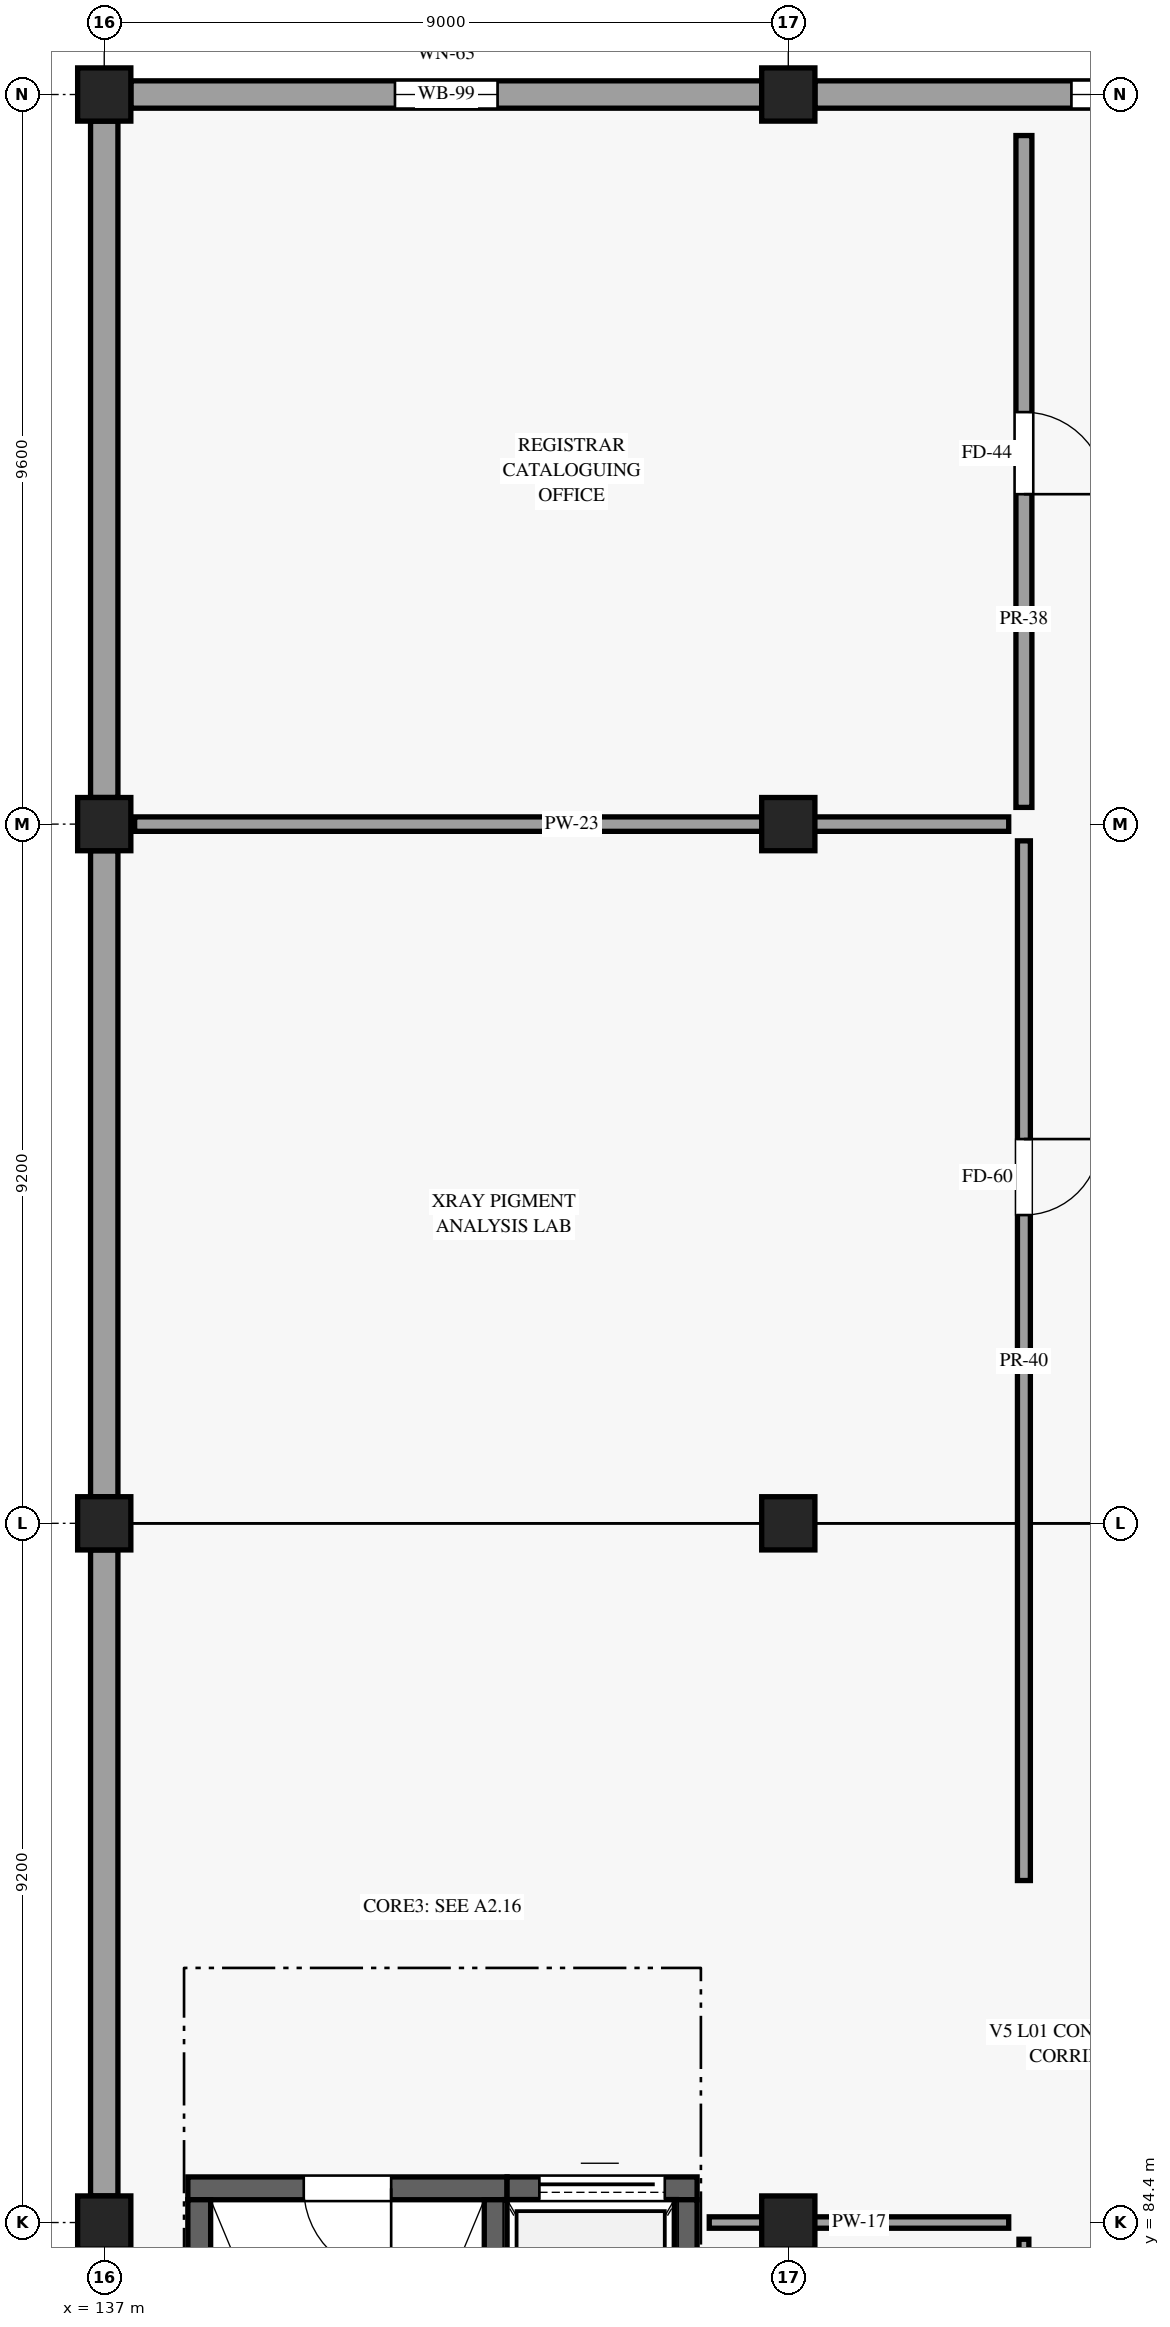
"""IFC4 building model, lengths in metres.
Left out: names, types, materials, properties, quantities, classifications, styles, units other than length and angle.
Written with IfcOpenShell. Run it as: python <this file> out.ifc"""

import sys

from ifc_helpers import new_model, si_unit, direction, frame, frame_2d, origin, origin_2d, place, context, subcontext, project, spatial, rectangle, extrude, element, fill, save


model = new_model("IFC4")
c1 = context("Model", 3, precision=1e-05, world=origin(), true_north=direction((0.0, 1.0)))
c2 = subcontext(c1, "Body", "Model", "MODEL_VIEW")
j1 = project(units=[si_unit("LENGTHUNIT", "METRE"), si_unit("PLANEANGLEUNIT", "RADIAN")], contexts=[c1])
p1 = place(None, origin())
s1 = spatial("IfcSite", under=j1, at=p1, CompositionType="ELEMENT")
p2 = place(p1, origin())
s2 = spatial("IfcBuilding", under=s1, at=p2, CompositionType="ELEMENT")
p3 = place(p2, frame((0.0, 0.0, 5.4)))
s3 = spatial("IfcBuildingStorey", under=s2, at=p3, CompositionType="ELEMENT", Elevation=5.4)
for number, where, z_axis, x_axis in (
    (1, (137.0, 84.4, 0.0), (0.0, 0.0, 1.0), (1.0, 0.0, 0.0)),
    (2, (137.0, 93.6, 0.0), (0.0, 0.0, 1.0), (1.0, 0.0, 0.0)),
    (3, (137.0, 102.8, 0.0), (0.0, 0.0, 1.0), (1.0, 0.0, 0.0)),
    (4, (137.0, 112.4, 0.0), (0.0, 0.0, 1.0), (1.0, 0.0, 0.0)),
    (5, (146.0, 84.4, 0.0), (0.0, 0.0, 1.0), (1.0, 0.0, 0.0)),
    (6, (146.0, 93.6, 0.0), (0.0, 0.0, 1.0), (1.0, 0.0, 0.0)),
    (7, (146.0, 102.8, 0.0), (0.0, 0.0, 1.0), (1.0, 0.0, 0.0)),
    (8, (146.0, 112.4, 0.0), (0.0, 0.0, 1.0), (1.0, 0.0, 0.0)),
):
    element("IfcColumn", number, at=place(p3, frame(where, z_axis=z_axis, x_axis=x_axis)), inside=s3, PredefinedType="COLUMN", context=c2, shape_type="SweptSolid", body=[
        extrude(rectangle(XDim=0.7, YDim=0.7, at=origin_2d()), origin(), (0.0, 0.0, 1.0), 4.8),
    ])
p4 = place(p3, frame((137.35, 112.4, 0.0), z_axis=(0.0, 0.0, 1.0), x_axis=(1.0, 0.0, 0.0)))
e9 = element("IfcWall", 9, at=p4, inside=s3, PredefinedType="STANDARD", context=c2, shape_type="SweptSolid", body=[
    extrude(rectangle(XDim=8.3, YDim=0.36, at=frame_2d((4.15, 0.0))), origin(), (0.0, 0.0, 1.0), 3.175),
])
p5 = place(p4, frame((3.475, 0.0, 0.85)))
e10 = element("IfcOpeningElement", 10, at=p5, cuts=e9, PredefinedType="OPENING", context=c2, shape_type="SweptSolid", body=[
    extrude(rectangle(XDim=1.35, YDim=1.75, at=frame_2d((0.675, 0.875))), frame((0.0, 0.19, 0.0), z_axis=(0.0, -1.0, 0.0), x_axis=(1.0, 0.0, 0.0)), (0.0, 0.0, 1.0), 0.38),
])
p6 = place(p3, frame((146.35, 112.4, 0.0), z_axis=(0.0, 0.0, 1.0), x_axis=(1.0, 0.0, 0.0)))
e11 = element("IfcWall", 11, at=p6, inside=s3, PredefinedType="STANDARD", context=c2, shape_type="SweptSolid", body=[
    extrude(rectangle(XDim=8.3, YDim=0.36, at=frame_2d((4.15, 0.0))), origin(), (0.0, 0.0, 1.0), 3.175),
])
p7 = place(p6, frame((3.375, 0.0, 0.85)))
e12 = element("IfcOpeningElement", 12, at=p7, cuts=e11, PredefinedType="OPENING", context=c2, shape_type="SweptSolid", body=[
    extrude(rectangle(XDim=1.55, YDim=1.95, at=frame_2d((0.775, 0.975))), frame((0.0, 0.19, 0.0), z_axis=(0.0, -1.0, 0.0), x_axis=(1.0, 0.0, 0.0)), (0.0, 0.0, 1.0), 0.38),
])
for number, where, z_axis, x_axis in (
    (13, (137.0, 84.75, 0.0), (0.0, 0.0, 1.0), (0.0, 1.0, 0.0)),
    (14, (137.0, 93.95, 0.0), (0.0, 0.0, 1.0), (0.0, 1.0, 0.0)),
):
    element("IfcWall", number, at=place(p3, frame(where, z_axis=z_axis, x_axis=x_axis)), inside=s3, PredefinedType="STANDARD", context=c2, shape_type="SweptSolid", body=[
        extrude(rectangle(XDim=8.5, YDim=0.36, at=frame_2d((4.25, 0.0))), origin(), (0.0, 0.0, 1.0), 3.175),
    ])
p8 = place(p3, frame((137.0, 103.15, 0.0), z_axis=(0.0, 0.0, 1.0), x_axis=(0.0, 1.0, 0.0)))
e15 = element("IfcWall", 15, at=p8, inside=s3, PredefinedType="STANDARD", context=c2, shape_type="SweptSolid", body=[
    extrude(rectangle(XDim=8.9, YDim=0.36, at=frame_2d((4.45, 0.0))), origin(), (0.0, 0.0, 1.0), 3.175),
])
p9 = place(p3, frame((138.1, 84.85, 0.0), z_axis=(0.0, 0.0, 1.0), x_axis=(1.0, 0.0, 0.0)))
e16 = element("IfcWall", 16, at=p9, inside=s3, PredefinedType="SHEAR", context=c2, shape_type="SweptSolid", body=[
    extrude(rectangle(XDim=4.2, YDim=0.3, at=frame_2d((2.1, 0.0))), origin(), (0.0, 0.0, 1.0), 4.44),
])
p10 = place(p9, frame((2.675, 0.0, 0.0), z_axis=(0.0, 0.0, 1.0), x_axis=(-1.0, 0.0, 0.0)))
e17 = element("IfcOpeningElement", 17, at=p10, cuts=e16, PredefinedType="OPENING", context=c2, shape_type="SweptSolid", body=[
    extrude(rectangle(XDim=1.15, YDim=2.2, at=frame_2d((0.575, 1.1))), frame((0.0, 0.16, 0.0), z_axis=(0.0, -1.0, 0.0), x_axis=(1.0, 0.0, 0.0)), (0.0, 0.0, 1.0), 0.32),
])
for number, where, z_axis, x_axis in (
    (18, (138.25, 76.05, 0.0), (0.0, 0.0, 1.0), (0.0, 1.0, 0.0)),
    (19, (142.15, 76.05, 0.0), (0.0, 0.0, 1.0), (0.0, 1.0, 0.0)),
):
    element("IfcWall", number, at=place(p3, frame(where, z_axis=z_axis, x_axis=x_axis)), inside=s3, PredefinedType="SHEAR", context=c2, shape_type="SweptSolid", body=[
        extrude(rectangle(XDim=8.65, YDim=0.3, at=frame_2d((4.325, 0.0))), origin(), (0.0, 0.0, 1.0), 4.44),
    ])
p11 = place(p3, frame((142.3, 84.85, 0.0), z_axis=(0.0, 0.0, 1.0), x_axis=(1.0, 0.0, 0.0)))
e20 = element("IfcWall", 20, at=p11, inside=s3, PredefinedType="SHEAR", context=c2, shape_type="SweptSolid", body=[
    extrude(rectangle(XDim=2.5, YDim=0.3, at=frame_2d((1.25, 0.0))), origin(), (0.0, 0.0, 1.0), 4.44),
])
p12 = place(p11, frame((0.425, 0.0, 0.0)))
e21 = element("IfcOpeningElement", 21, at=p12, cuts=e20, PredefinedType="OPENING", context=c2, shape_type="SweptSolid", body=[
    extrude(rectangle(XDim=1.65, YDim=2.45, at=frame_2d((0.825, 1.225))), frame((0.0, 0.16, 0.0), z_axis=(0.0, -1.0, 0.0), x_axis=(1.0, 0.0, 0.0)), (0.0, 0.0, 1.0), 0.32),
])
p13 = place(p3, frame((144.65, 80.9, 0.0), z_axis=(0.0, 0.0, 1.0), x_axis=(0.0, 1.0, 0.0)))
e22 = element("IfcWall", 22, at=p13, inside=s3, PredefinedType="SHEAR", context=c2, shape_type="SweptSolid", body=[
    extrude(rectangle(XDim=3.8, YDim=0.3, at=frame_2d((1.9, 0.0))), origin(), (0.0, 0.0, 1.0), 4.44),
])
p14 = place(p3, frame((149.1, 75.42, 0.0), z_axis=(0.0, 0.0, 1.0), x_axis=(0.0, 1.0, 0.0)))
e23 = element("IfcWall", 23, at=p14, inside=s3, PredefinedType="PARTITIONING", context=c2, shape_type="SweptSolid", body=[
    extrude(rectangle(XDim=8.76, YDim=0.13, at=frame_2d((4.38, 0.0))), origin(), (0.0, 0.0, 1.0), 3.175),
])
p15 = place(p14, frame((4.83, 0.0, 0.0), z_axis=(0.0, 0.0, 1.0), x_axis=(-1.0, 0.0, 0.0)))
e24 = element("IfcOpeningElement", 24, at=p15, cuts=e23, PredefinedType="OPENING", context=c2, shape_type="SweptSolid", body=[
    extrude(rectangle(XDim=0.95, YDim=2.15, at=frame_2d((0.475, 1.075))), frame((0.0, 0.075, 0.0), z_axis=(0.0, -1.0, 0.0), x_axis=(1.0, 0.0, 0.0)), (0.0, 0.0, 1.0), 0.15),
])
p16 = place(p3, frame((144.96, 84.4, 0.0), z_axis=(0.0, 0.0, 1.0), x_axis=(1.0, 0.0, 0.0)))
e25 = element("IfcWall", 25, at=p16, inside=s3, PredefinedType="PARTITIONING", context=c2, shape_type="SweptSolid", body=[
    extrude(rectangle(XDim=3.94, YDim=0.15, at=frame_2d((1.97, 0.0))), origin(), (0.0, 0.0, 1.0), 3.175),
])
p17 = place(p3, frame((149.1, 88.9, 0.0), z_axis=(0.0, 0.0, 1.0), x_axis=(0.0, 1.0, 0.0)))
e26 = element("IfcWall", 26, at=p17, inside=s3, PredefinedType="PARTITIONING", context=c2, shape_type="SweptSolid", body=[
    extrude(rectangle(XDim=13.68, YDim=0.17, at=frame_2d((6.84, 0.0))), origin(), (0.0, 0.0, 1.0), 3.175),
])
p18 = place(p17, frame((9.756, 0.0, 0.0), z_axis=(0.0, 0.0, 1.0), x_axis=(-1.0, 0.0, 0.0)))
e27 = element("IfcOpeningElement", 27, at=p18, cuts=e26, PredefinedType="OPENING", context=c2, shape_type="SweptSolid", body=[
    extrude(rectangle(XDim=1.0, YDim=2.2, at=frame_2d((0.5, 1.1))), frame((0.0, 0.095, 0.0), z_axis=(0.0, -1.0, 0.0), x_axis=(1.0, 0.0, 0.0)), (0.0, 0.0, 1.0), 0.19),
])
p19 = place(p3, frame((137.4, 102.8, 0.0), z_axis=(0.0, 0.0, 1.0), x_axis=(1.0, 0.0, 0.0)))
e28 = element("IfcWall", 28, at=p19, inside=s3, PredefinedType="PARTITIONING", context=c2, shape_type="SweptSolid", body=[
    extrude(rectangle(XDim=11.5, YDim=0.19, at=frame_2d((5.75, 0.0))), origin(), (0.0, 0.0, 1.0), 3.175),
])
p20 = place(p3, frame((149.1, 103.02, 0.0), z_axis=(0.0, 0.0, 1.0), x_axis=(0.0, 1.0, 0.0)))
e29 = element("IfcWall", 29, at=p20, inside=s3, PredefinedType="PARTITIONING", context=c2, shape_type="SweptSolid", body=[
    extrude(rectangle(XDim=8.84, YDim=0.21, at=frame_2d((4.42, 0.0))), origin(), (0.0, 0.0, 1.0), 3.175),
])
p21 = place(p20, frame((5.201, 0.0, 0.0), z_axis=(0.0, 0.0, 1.0), x_axis=(-1.0, 0.0, 0.0)))
e30 = element("IfcOpeningElement", 30, at=p21, cuts=e29, PredefinedType="OPENING", context=c2, shape_type="SweptSolid", body=[
    extrude(rectangle(XDim=1.08, YDim=2.24, at=frame_2d((0.54, 1.12))), frame((0.0, 0.115, 0.0), z_axis=(0.0, -1.0, 0.0), x_axis=(1.0, 0.0, 0.0)), (0.0, 0.0, 1.0), 0.23),
])
p22 = place(p5, origin())
e31 = element("IfcWindow", 31, at=p22, inside=s3, PartitioningType="SINGLE_PANEL", PredefinedType="WINDOW", context=c2, shape_type="SweptSolid", body=[
    extrude(rectangle(XDim=1.35, YDim=1.75, at=frame_2d((0.675, 0.875))), frame((0.0, 0.03, 0.0), z_axis=(0.0, -1.0, 0.0), x_axis=(1.0, 0.0, 0.0)), (0.0, 0.0, 1.0), 0.06),
])
fill(e10, e31)
p23 = place(p7, origin())
e32 = element("IfcWindow", 32, at=p23, inside=s3, PartitioningType="SINGLE_PANEL", PredefinedType="WINDOW", context=c2, shape_type="SweptSolid", body=[
    extrude(rectangle(XDim=1.55, YDim=1.95, at=frame_2d((0.775, 0.975))), frame((0.0, 0.03, 0.0), z_axis=(0.0, -1.0, 0.0), x_axis=(1.0, 0.0, 0.0)), (0.0, 0.0, 1.0), 0.06),
])
fill(e12, e32)
p24 = place(p10, origin())
e33 = element("IfcDoor", 33, at=p24, inside=s3, OperationType="SINGLE_SWING_LEFT", PredefinedType="DOOR", context=c2, shape_type="SweptSolid", body=[
    extrude(rectangle(XDim=1.15, YDim=2.2, at=frame_2d((0.575, 1.1))), frame((0.0, 0.025, 0.0), z_axis=(0.0, -1.0, 0.0), x_axis=(1.0, 0.0, 0.0)), (0.0, 0.0, 1.0), 0.05),
])
fill(e17, e33)
p25 = place(p12, origin())
e34 = element("IfcDoor", 34, at=p25, inside=s3, OperationType="SLIDING_TO_LEFT", PredefinedType="DOOR", context=c2, shape_type="SweptSolid", body=[
    extrude(rectangle(XDim=1.65, YDim=2.45, at=frame_2d((0.825, 1.225))), frame((0.0, 0.025, 0.0), z_axis=(0.0, -1.0, 0.0), x_axis=(1.0, 0.0, 0.0)), (0.0, 0.0, 1.0), 0.05),
])
fill(e21, e34)
p26 = place(p18, origin())
e35 = element("IfcDoor", 35, at=p26, inside=s3, OperationType="SINGLE_SWING_LEFT", PredefinedType="DOOR", context=c2, shape_type="SweptSolid", body=[
    extrude(rectangle(XDim=1.0, YDim=2.2, at=frame_2d((0.5, 1.1))), frame((0.0, 0.025, 0.0), z_axis=(0.0, -1.0, 0.0), x_axis=(1.0, 0.0, 0.0)), (0.0, 0.0, 1.0), 0.05),
])
fill(e27, e35)
p27 = place(p21, origin())
e36 = element("IfcDoor", 36, at=p27, inside=s3, OperationType="SINGLE_SWING_RIGHT", PredefinedType="DOOR", context=c2, shape_type="SweptSolid", body=[
    extrude(rectangle(XDim=1.08, YDim=2.24, at=frame_2d((0.54, 1.12))), frame((0.0, 0.025, 0.0), z_axis=(0.0, -1.0, 0.0), x_axis=(1.0, 0.0, 0.0)), (0.0, 0.0, 1.0), 0.05),
])
fill(e30, e36)
save(model, sys.argv[1])
